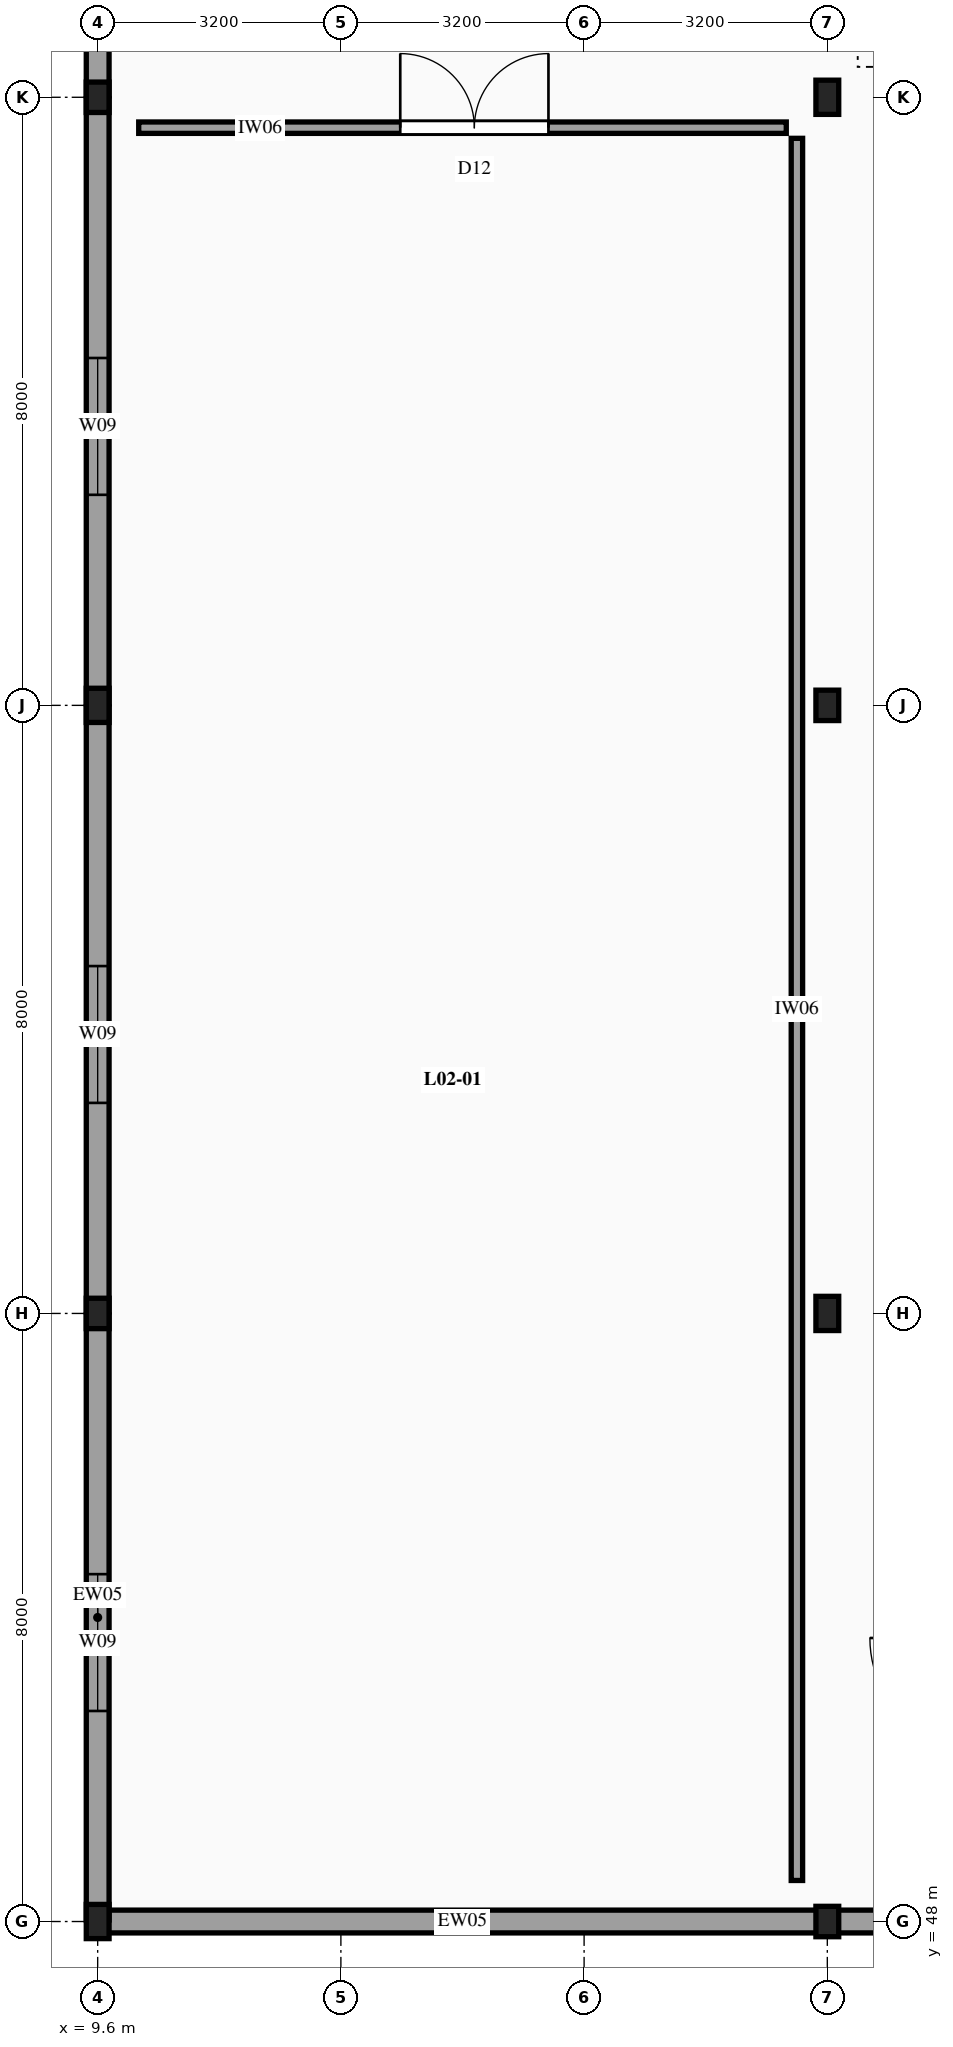
"""IFC4 building model, lengths in metres.
Left out: names, types, materials, properties, quantities, classifications, styles, units other than length and angle.
Written with IfcOpenShell. Run it as: python <this file> out.ifc"""

import sys

from ifc_helpers import new_model, si_unit, direction, frame, frame_2d, origin, origin_2d, place, context, subcontext, project, spatial, rectangle, i_section, extrude, element, fill, save


model = new_model("IFC4")
c1 = context("Model", 3, precision=1e-05, world=origin(), true_north=direction((0.0, 1.0)))
c2 = subcontext(c1, "Body", "Model", "MODEL_VIEW")
j1 = project(units=[si_unit("LENGTHUNIT", "METRE"), si_unit("PLANEANGLEUNIT", "RADIAN")], contexts=[c1])
p1 = place(None, origin())
s1 = spatial("IfcSite", under=j1, at=p1, CompositionType="ELEMENT")
p2 = place(p1, origin())
s2 = spatial("IfcBuilding", under=s1, at=p2, CompositionType="ELEMENT")
p3 = place(p2, frame((0.0, 0.0, 8.7)))
s3 = spatial("IfcBuildingStorey", under=s2, at=p3, CompositionType="ELEMENT", Elevation=8.7)
p4 = place(p3, frame((9.6, 48.0, -0.26), z_axis=(0.0, 0.0, 1.0), x_axis=(1.0, 0.0, 0.0)))
e1 = element("IfcColumn", 1, at=p4, inside=s3, PredefinedType="COLUMN", context=c2, shape_type="SweptSolid", body=[
    extrude(i_section(OverallWidth=0.3, OverallDepth=0.45, WebThickness=0.014, FlangeThickness=0.026, FilletRadius=0.027, at=origin_2d()), origin(), (0.0, 0.0, 1.0), 4.2),
])
p5 = place(p3, frame((9.6, 56.0, -0.26), z_axis=(0.0, 0.0, 1.0), x_axis=(1.0, 0.0, 0.0)))
e2 = element("IfcColumn", 2, at=p5, inside=s3, PredefinedType="COLUMN", context=c2, shape_type="SweptSolid", body=[
    extrude(i_section(OverallWidth=0.3, OverallDepth=0.4, WebThickness=0.013, FlangeThickness=0.024, FilletRadius=0.027, at=origin_2d()), origin(), (0.0, 0.0, 1.0), 4.2),
])
p6 = place(p3, frame((9.6, 64.0, -0.26), z_axis=(0.0, 0.0, 1.0), x_axis=(1.0, 0.0, 0.0)))
e3 = element("IfcColumn", 3, at=p6, inside=s3, PredefinedType="COLUMN", context=c2, shape_type="SweptSolid", body=[
    extrude(i_section(OverallWidth=0.3, OverallDepth=0.45, WebThickness=0.014, FlangeThickness=0.026, FilletRadius=0.027, at=origin_2d()), origin(), (0.0, 0.0, 1.0), 4.2),
])
for number, where, z_axis, x_axis in (
    (4, (9.6, 72.0, -0.26), (0.0, 0.0, 1.0), (1.0, 0.0, 0.0)),
    (5, (19.2, 48.0, -0.26), (0.0, 0.0, 1.0), (1.0, 0.0, 0.0)),
):
    element("IfcColumn", number, at=place(p3, frame(where, z_axis=z_axis, x_axis=x_axis)), inside=s3, PredefinedType="COLUMN", context=c2, shape_type="SweptSolid", body=[
        extrude(i_section(OverallWidth=0.3, OverallDepth=0.4, WebThickness=0.013, FlangeThickness=0.024, FilletRadius=0.027, at=origin_2d()), origin(), (0.0, 0.0, 1.0), 4.2),
    ])
p7 = place(p3, frame((19.2, 56.0, -0.26), z_axis=(0.0, 0.0, 1.0), x_axis=(1.0, 0.0, 0.0)))
e6 = element("IfcColumn", 6, at=p7, inside=s3, PredefinedType="COLUMN", context=c2, shape_type="SweptSolid", body=[
    extrude(i_section(OverallWidth=0.3, OverallDepth=0.45, WebThickness=0.014, FlangeThickness=0.026, FilletRadius=0.027, at=origin_2d()), origin(), (0.0, 0.0, 1.0), 4.2),
])
p8 = place(p3, frame((19.2, 64.0, -0.26), z_axis=(0.0, 0.0, 1.0), x_axis=(1.0, 0.0, 0.0)))
e7 = element("IfcColumn", 7, at=p8, inside=s3, PredefinedType="COLUMN", context=c2, shape_type="SweptSolid", body=[
    extrude(i_section(OverallWidth=0.3, OverallDepth=0.4, WebThickness=0.013, FlangeThickness=0.024, FilletRadius=0.027, at=origin_2d()), origin(), (0.0, 0.0, 1.0), 4.2),
])
p9 = place(p3, frame((19.2, 72.0, -0.26), z_axis=(0.0, 0.0, 1.0), x_axis=(1.0, 0.0, 0.0)))
e8 = element("IfcColumn", 8, at=p9, inside=s3, PredefinedType="COLUMN", context=c2, shape_type="SweptSolid", body=[
    extrude(i_section(OverallWidth=0.3, OverallDepth=0.45, WebThickness=0.014, FlangeThickness=0.026, FilletRadius=0.027, at=origin_2d()), origin(), (0.0, 0.0, 1.0), 4.2),
])
p10 = place(p3, frame((9.62, 48.0, 0.0), z_axis=(0.0, 0.0, 1.0), x_axis=(1.0, 0.0, 0.0)))
e9 = element("IfcWall", 9, at=p10, inside=s3, PredefinedType="SOLIDWALL", context=c2, shape_type="SweptSolid", body=[
    extrude(rectangle(XDim=9.56, YDim=0.3, at=frame_2d((4.78, 0.0))), origin(), (0.0, 0.0, 1.0), 3.36),
])
p11 = place(p3, frame((19.22, 48.0, 0.0), z_axis=(0.0, 0.0, 1.0), x_axis=(1.0, 0.0, 0.0)))
e10 = element("IfcWall", 10, at=p11, inside=s3, PredefinedType="SOLIDWALL", context=c2, shape_type="SweptSolid", body=[
    extrude(rectangle(XDim=9.56, YDim=0.3, at=frame_2d((4.78, 0.0))), origin(), (0.0, 0.0, 1.0), 3.36),
])
p12 = place(p3, frame((9.6, 48.02, 0.0), z_axis=(0.0, 0.0, 1.0), x_axis=(0.0, 1.0, 0.0)))
e11 = element("IfcWall", 11, at=p12, inside=s3, PredefinedType="SOLIDWALL", context=c2, shape_type="SweptSolid", body=[
    extrude(rectangle(XDim=7.96, YDim=0.3, at=frame_2d((3.98, 0.0))), origin(), (0.0, 0.0, 1.0), 3.36),
])
p13 = place(p12, frame((2.75, 0.0, 0.85)))
e12 = element("IfcOpeningElement", 12, at=p13, cuts=e11, PredefinedType="OPENING", context=c2, shape_type="SweptSolid", body=[
    extrude(rectangle(XDim=1.8, YDim=2.1, at=frame_2d((0.9, 1.05))), frame((0.0, 0.16, 0.0), z_axis=(0.0, -1.0, 0.0), x_axis=(1.0, 0.0, 0.0)), (0.0, 0.0, 1.0), 0.32),
])
p14 = place(p3, frame((9.6, 56.02, 0.0), z_axis=(0.0, 0.0, 1.0), x_axis=(0.0, 1.0, 0.0)))
e13 = element("IfcWall", 13, at=p14, inside=s3, PredefinedType="SOLIDWALL", context=c2, shape_type="SweptSolid", body=[
    extrude(rectangle(XDim=7.96, YDim=0.3, at=frame_2d((3.98, 0.0))), origin(), (0.0, 0.0, 1.0), 3.36),
])
p15 = place(p14, frame((2.75, 0.0, 0.85)))
e14 = element("IfcOpeningElement", 14, at=p15, cuts=e13, PredefinedType="OPENING", context=c2, shape_type="SweptSolid", body=[
    extrude(rectangle(XDim=1.8, YDim=2.1, at=frame_2d((0.9, 1.05))), frame((0.0, 0.16, 0.0), z_axis=(0.0, -1.0, 0.0), x_axis=(1.0, 0.0, 0.0)), (0.0, 0.0, 1.0), 0.32),
])
p16 = place(p3, frame((9.6, 64.02, 0.0), z_axis=(0.0, 0.0, 1.0), x_axis=(0.0, 1.0, 0.0)))
e15 = element("IfcWall", 15, at=p16, inside=s3, PredefinedType="SOLIDWALL", context=c2, shape_type="SweptSolid", body=[
    extrude(rectangle(XDim=7.96, YDim=0.3, at=frame_2d((3.98, 0.0))), origin(), (0.0, 0.0, 1.0), 3.36),
])
p17 = place(p16, frame((2.75, 0.0, 0.85)))
e16 = element("IfcOpeningElement", 16, at=p17, cuts=e15, PredefinedType="OPENING", context=c2, shape_type="SweptSolid", body=[
    extrude(rectangle(XDim=1.8, YDim=2.1, at=frame_2d((0.9, 1.05))), frame((0.0, 0.16, 0.0), z_axis=(0.0, -1.0, 0.0), x_axis=(1.0, 0.0, 0.0)), (0.0, 0.0, 1.0), 0.32),
])
p18 = place(p3, frame((9.6, 72.02, 0.0), z_axis=(0.0, 0.0, 1.0), x_axis=(0.0, 1.0, 0.0)))
e17 = element("IfcWall", 17, at=p18, inside=s3, PredefinedType="SOLIDWALL", context=c2, shape_type="SweptSolid", body=[
    extrude(rectangle(XDim=7.96, YDim=0.3, at=frame_2d((3.98, 0.0))), origin(), (0.0, 0.0, 1.0), 3.36),
])
p19 = place(p18, frame((2.75, 0.0, 0.85)))
e18 = element("IfcOpeningElement", 18, at=p19, cuts=e17, PredefinedType="OPENING", context=c2, shape_type="SweptSolid", body=[
    extrude(rectangle(XDim=1.8, YDim=2.1, at=frame_2d((0.9, 1.05))), frame((0.0, 0.16, 0.0), z_axis=(0.0, -1.0, 0.0), x_axis=(1.0, 0.0, 0.0)), (0.0, 0.0, 1.0), 0.32),
])
p20 = place(p3, frame((10.14, 71.6, 0.0), z_axis=(0.0, 0.0, 1.0), x_axis=(1.0, 0.0, 0.0)))
e19 = element("IfcWall", 19, at=p20, inside=s3, PredefinedType="PARTITIONING", context=c2, shape_type="SweptSolid", body=[
    extrude(rectangle(XDim=8.52, YDim=0.15, at=frame_2d((4.26, 0.0))), origin(), (0.0, 0.0, 1.0), 3.1),
])
p21 = place(p20, frame((3.441, 0.0, 0.0)))
e20 = element("IfcOpeningElement", 20, at=p21, cuts=e19, PredefinedType="OPENING", context=c2, shape_type="SweptSolid", body=[
    extrude(rectangle(XDim=1.95, YDim=2.55, at=frame_2d((0.975, 1.275))), frame((0.0, 0.085, 0.0), z_axis=(0.0, -1.0, 0.0), x_axis=(1.0, 0.0, 0.0)), (0.0, 0.0, 1.0), 0.17),
])
p22 = place(p3, frame((18.8, 48.54, 0.0), z_axis=(0.0, 0.0, 1.0), x_axis=(0.0, 1.0, 0.0)))
e21 = element("IfcWall", 21, at=p22, inside=s3, PredefinedType="PARTITIONING", context=c2, shape_type="SweptSolid", body=[
    extrude(rectangle(XDim=22.92, YDim=0.15, at=frame_2d((11.46, 0.0))), origin(), (0.0, 0.0, 1.0), 3.1),
])
p23 = place(p13, origin())
e22 = element("IfcWindow", 22, at=p23, inside=s3, PartitioningType="SINGLE_PANEL", PredefinedType="WINDOW", context=c2, shape_type="SweptSolid", body=[
    extrude(rectangle(XDim=1.8, YDim=2.1, at=frame_2d((0.9, 1.05))), frame((0.0, 0.03, 0.0), z_axis=(0.0, -1.0, 0.0), x_axis=(1.0, 0.0, 0.0)), (0.0, 0.0, 1.0), 0.06),
])
fill(e12, e22)
p24 = place(p15, origin())
e23 = element("IfcWindow", 23, at=p24, inside=s3, PartitioningType="SINGLE_PANEL", PredefinedType="WINDOW", context=c2, shape_type="SweptSolid", body=[
    extrude(rectangle(XDim=1.8, YDim=2.1, at=frame_2d((0.9, 1.05))), frame((0.0, 0.03, 0.0), z_axis=(0.0, -1.0, 0.0), x_axis=(1.0, 0.0, 0.0)), (0.0, 0.0, 1.0), 0.06),
])
fill(e14, e23)
p25 = place(p17, origin())
e24 = element("IfcWindow", 24, at=p25, inside=s3, PartitioningType="SINGLE_PANEL", PredefinedType="WINDOW", context=c2, shape_type="SweptSolid", body=[
    extrude(rectangle(XDim=1.8, YDim=2.1, at=frame_2d((0.9, 1.05))), frame((0.0, 0.03, 0.0), z_axis=(0.0, -1.0, 0.0), x_axis=(1.0, 0.0, 0.0)), (0.0, 0.0, 1.0), 0.06),
])
fill(e16, e24)
p26 = place(p21, origin())
e25 = element("IfcDoor", 25, at=p26, inside=s3, OperationType="DOUBLE_DOOR_SINGLE_SWING", PredefinedType="DOOR", context=c2, shape_type="SweptSolid", body=[
    extrude(rectangle(XDim=1.95, YDim=2.55, at=frame_2d((0.975, 1.275))), frame((0.0, 0.025, 0.0), z_axis=(0.0, -1.0, 0.0), x_axis=(1.0, 0.0, 0.0)), (0.0, 0.0, 1.0), 0.05),
])
fill(e20, e25)
save(model, sys.argv[1])
